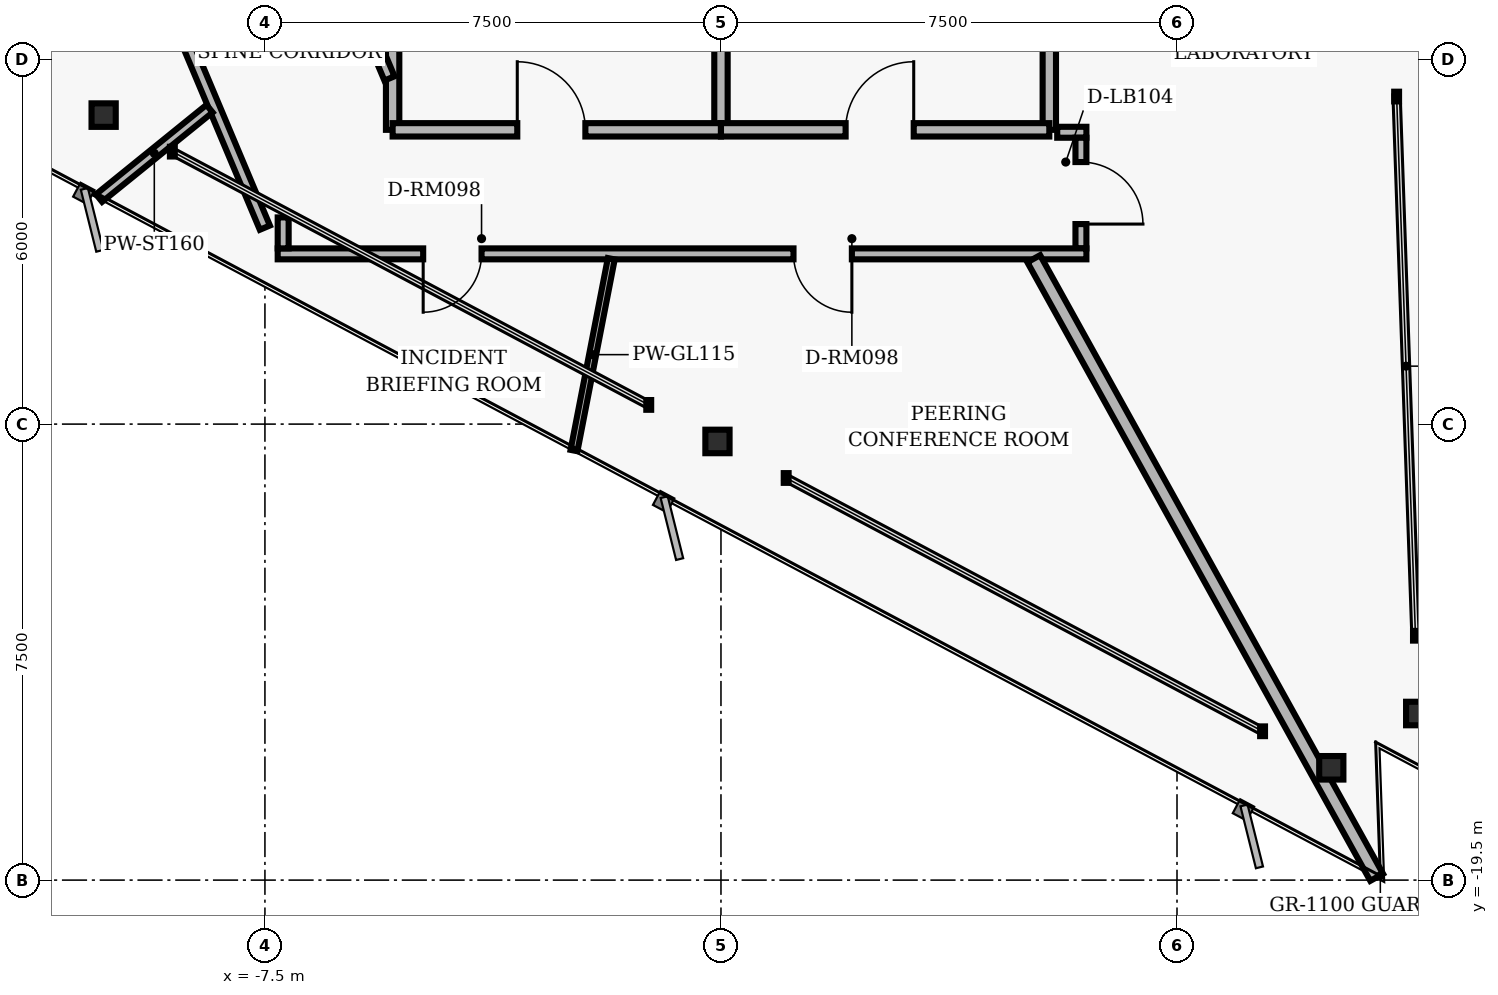
"""IFC4 building model, lengths in metres.
Left out: names, types, materials, properties, quantities, classifications, styles, units other than length and angle.
Written with IfcOpenShell. Run it as: python <this file> out.ifc"""

import sys

from ifc_helpers import new_model, si_unit, direction, frame, frame_2d, origin, origin_2d, place, context, subcontext, project, spatial, rectangle, i_section, extrude, element, fill, save


model = new_model("IFC4")
c1 = context("Model", 3, precision=1e-05, world=origin(), true_north=direction((0.0, 1.0)))
c2 = subcontext(c1, "Body", "Model", "MODEL_VIEW")
j1 = project(units=[si_unit("LENGTHUNIT", "METRE"), si_unit("PLANEANGLEUNIT", "RADIAN")], contexts=[c1])
p1 = place(None, origin())
s1 = spatial("IfcSite", under=j1, at=p1, CompositionType="ELEMENT")
p2 = place(p1, origin())
s2 = spatial("IfcBuilding", under=s1, at=p2, CompositionType="ELEMENT")
p3 = place(p2, frame((0.0, 0.0, 196.64)))
s3 = spatial("IfcBuildingStorey", under=s2, at=p3, CompositionType="ELEMENT", Elevation=196.64)
for number, where, z_axis, x_axis in (
    (1, (11.466, -16.76, 0.0), (0.0, 0.0, 1.0), (1.0, 0.0, 0.0)),
    (2, (-10.153, -6.918, 0.0), (0.0, 0.0, 1.0), (1.0, 0.0, 0.0)),
    (3, (-0.058, -12.285, 0.0), (0.0, 0.0, 1.0), (1.0, 0.0, 0.0)),
    (4, (10.037, -17.653, 0.0), (0.0, 0.0, 1.0), (1.0, 0.0, 0.0)),
):
    element("IfcColumn", number, at=place(p3, frame(where, z_axis=z_axis, x_axis=x_axis)), inside=s3, PredefinedType="COLUMN", context=c2, shape_type="SweptSolid", body=[
        extrude(i_section(OverallWidth=0.398, OverallDepth=0.387, WebThickness=0.021, FlangeThickness=0.033, FilletRadius=0.018, at=origin_2d()), origin(), (0.0, 0.0, 1.0), 3.04),
    ])
for number, where, z_axis, x_axis in (
    (5, (-5.4, -7.16, 0.0), (0.0, 0.0, 1.0), (0.0, 1.0, 0.0)),
    (6, (5.4, -7.16, 0.0), (0.0, 0.0, 1.0), (0.0, 1.0, 0.0)),
):
    element("IfcWall", number, at=place(p3, frame(where, z_axis=z_axis, x_axis=x_axis)), inside=s3, PredefinedType="PARTITIONING", context=c2, shape_type="SweptSolid", body=[
        extrude(rectangle(XDim=2.71, YDim=0.22, at=frame_2d((1.355, 0.0))), origin(), (0.0, 0.0, 1.0), 2.773),
    ])
p4 = place(p3, frame((0.0, -7.16, 0.0), z_axis=(0.0, 0.0, 1.0), x_axis=(0.0, 1.0, 0.0)))
e7 = element("IfcWall", 7, at=p4, inside=s3, PredefinedType="PARTITIONING", context=c2, shape_type="SweptSolid", body=[
    extrude(rectangle(XDim=2.81, YDim=0.22, at=frame_2d((1.405, 0.0))), origin(), (0.0, 0.0, 1.0), 2.773),
])
p5 = place(p3, frame((-5.4, -7.16, 0.0), z_axis=(0.0, 0.0, 1.0), x_axis=(1.0, 0.0, 0.0)))
e8 = element("IfcWall", 8, at=p5, inside=s3, PredefinedType="PARTITIONING", context=c2, shape_type="SweptSolid", body=[
    extrude(rectangle(XDim=5.4, YDim=0.22, at=frame_2d((2.7, 0.0))), origin(), (0.0, 0.0, 1.0), 2.395),
])
p6 = place(p5, frame((2.05, 0.0, 0.0)))
e9 = element("IfcOpeningElement", 9, at=p6, cuts=e8, PredefinedType="OPENING", context=c2, shape_type="SweptSolid", body=[
    extrude(rectangle(XDim=1.12, YDim=2.02, at=frame_2d((0.56, 1.01))), frame((0.0, 0.12, 0.0), z_axis=(0.0, -1.0, 0.0), x_axis=(1.0, 0.0, 0.0)), (0.0, 0.0, 1.0), 0.24),
])
p7 = place(p3, frame((0.0, -7.16, 0.0), z_axis=(0.0, 0.0, 1.0), x_axis=(1.0, 0.0, 0.0)))
e10 = element("IfcWall", 10, at=p7, inside=s3, PredefinedType="PARTITIONING", context=c2, shape_type="SweptSolid", body=[
    extrude(rectangle(XDim=5.4, YDim=0.22, at=frame_2d((2.7, 0.0))), origin(), (0.0, 0.0, 1.0), 2.773),
])
p8 = place(p7, frame((2.05, 0.0, 0.0)))
e11 = element("IfcOpeningElement", 11, at=p8, cuts=e10, PredefinedType="OPENING", context=c2, shape_type="SweptSolid", body=[
    extrude(rectangle(XDim=1.12, YDim=2.02, at=frame_2d((0.56, 1.01))), frame((0.0, 0.12, 0.0), z_axis=(0.0, -1.0, 0.0), x_axis=(1.0, 0.0, 0.0)), (0.0, 0.0, 1.0), 0.24),
])
p9 = place(p3, frame((-7.501, -8.769, 0.0), z_axis=(0.0, 0.0, 1.0), x_axis=(-0.387573945081, 0.921838617706, 0.0)))
e12 = element("IfcWall", 12, at=p9, inside=s3, PredefinedType="PARTITIONING", context=c2, shape_type="SweptSolid", body=[
    extrude(rectangle(XDim=4.813, YDim=0.18, at=frame_2d((2.407, 0.0))), origin(), (0.0, 0.0, 1.0), 2.773),
])
p10 = place(p3, frame((-6.055, -4.882, 0.0), z_axis=(0.0, 0.0, 1.0), x_axis=(0.387579540458, -0.921836265189, 0.0)))
e13 = element("IfcWall", 13, at=p10, inside=s3, PredefinedType="PARTITIONING", context=c2, shape_type="SweptSolid", body=[
    extrude(rectangle(XDim=1.555, YDim=0.18, at=frame_2d((0.777, 0.0))), origin(), (0.0, 0.0, 1.0), 2.253),
])
p11 = place(p3, frame((5.53, -7.2, 0.0), z_axis=(0.0, 0.0, 1.0), x_axis=(1.0, 0.0, 0.0)))
e14 = element("IfcWall", 14, at=p11, inside=s3, PredefinedType="PARTITIONING", context=c2, shape_type="SweptSolid", body=[
    extrude(rectangle(XDim=0.48, YDim=0.18, at=frame_2d((0.24, 0.0))), origin(), (0.0, 0.0, 1.0), 2.773),
])
p12 = place(p3, frame((5.92, -7.29, 0.0), z_axis=(0.0, 0.0, 1.0), x_axis=(0.0, -1.0, 0.0)))
e15 = element("IfcWall", 15, at=p12, inside=s3, PredefinedType="PARTITIONING", context=c2, shape_type="SweptSolid", body=[
    extrude(rectangle(XDim=1.82, YDim=0.18, at=frame_2d((0.91, 0.0))), origin(), (0.0, 0.0, 1.0), 2.773),
])
p13 = place(p12, frame((0.4, 0.0, 0.0)))
e16 = element("IfcOpeningElement", 16, at=p13, cuts=e15, PredefinedType="OPENING", context=c2, shape_type="SweptSolid", body=[
    extrude(rectangle(XDim=1.02, YDim=2.02, at=frame_2d((0.51, 1.01))), frame((0.0, 0.1, 0.0), z_axis=(0.0, -1.0, 0.0), x_axis=(1.0, 0.0, 0.0)), (0.0, 0.0, 1.0), 0.2),
])
p14 = place(p3, frame((6.01, -9.2, 0.0), z_axis=(0.0, 0.0, 1.0), x_axis=(-1.0, 0.0, 0.0)))
e17 = element("IfcWall", 17, at=p14, inside=s3, PredefinedType="PARTITIONING", context=c2, shape_type="SweptSolid", body=[
    extrude(rectangle(XDim=13.3, YDim=0.18, at=frame_2d((6.65, 0.0))), origin(), (0.0, 0.0, 1.0), 2.395),
])
p15 = place(p14, frame((9.948, 0.0, 0.0)))
e18 = element("IfcOpeningElement", 18, at=p15, cuts=e17, PredefinedType="OPENING", context=c2, shape_type="SweptSolid", body=[
    extrude(rectangle(XDim=0.96, YDim=2.02, at=frame_2d((0.48, 1.01))), frame((0.0, 0.1, 0.0), z_axis=(0.0, -1.0, 0.0), x_axis=(1.0, 0.0, 0.0)), (0.0, 0.0, 1.0), 0.2),
])
p16 = place(p14, frame((3.857, 0.0, 0.0)))
e19 = element("IfcOpeningElement", 19, at=p16, cuts=e17, PredefinedType="OPENING", context=c2, shape_type="SweptSolid", body=[
    extrude(rectangle(XDim=0.96, YDim=2.02, at=frame_2d((0.48, 1.01))), frame((0.0, 0.1, 0.0), z_axis=(0.0, -1.0, 0.0), x_axis=(1.0, 0.0, 0.0)), (0.0, 0.0, 1.0), 0.2),
])
p17 = place(p3, frame((-7.2, -9.11, 0.0), z_axis=(0.0, 0.0, 1.0), x_axis=(0.0, 1.0, 0.0)))
e20 = element("IfcWall", 20, at=p17, inside=s3, PredefinedType="PARTITIONING", context=c2, shape_type="SweptSolid", body=[
    extrude(rectangle(XDim=0.51, YDim=0.18, at=frame_2d((0.255, 0.0))), origin(), (0.0, 0.0, 1.0), 2.773),
])
p18 = place(p3, frame((-8.411, -6.811, 0.0), z_axis=(0.0, 0.0, 1.0), x_axis=(-0.777176762159, -0.629282353448, 0.0)))
e21 = element("IfcWall", 21, at=p18, inside=s3, PredefinedType="PARTITIONING", context=c2, shape_type="SweptSolid", body=[
    extrude(rectangle(XDim=2.337, YDim=0.16, at=frame_2d((1.169, 0.0))), origin(), (0.0, 0.0, 1.0), 2.773),
])
p19 = place(p3, frame((-1.804, -9.28, 0.0), z_axis=(0.0, 0.0, 1.0), x_axis=(-0.190810698239, -0.981626852443, 0.0)))
e22 = element("IfcWall", 22, at=p19, inside=s3, PredefinedType="MOVABLE", context=c2, shape_type="SweptSolid", body=[
    extrude(rectangle(XDim=3.214, YDim=0.115, at=frame_2d((1.607, 0.0))), origin(), (0.0, 0.0, 1.0), 2.773),
])
p20 = place(p3, frame((5.144, -9.28, 0.0), z_axis=(0.0, 0.0, 1.0), x_axis=(0.484798043034, -0.874626124393, 0.0)))
e23 = element("IfcWall", 23, at=p20, inside=s3, PredefinedType="PARTITIONING", context=c2, shape_type="SweptSolid", body=[
    extrude(rectangle(XDim=11.633, YDim=0.24, at=frame_2d((5.816, 0.0))), origin(), (0.0, 0.0, 1.0), 2.253),
])
p21 = place(p6, origin())
e24 = element("IfcDoor", 24, at=p21, inside=s3, OperationType="SINGLE_SWING_LEFT", PredefinedType="DOOR", context=c2, shape_type="SweptSolid", body=[
    extrude(rectangle(XDim=1.12, YDim=2.02, at=frame_2d((0.56, 1.01))), frame((0.0, 0.025, 0.0), z_axis=(0.0, -1.0, 0.0), x_axis=(1.0, 0.0, 0.0)), (0.0, 0.0, 1.0), 0.05),
])
fill(e9, e24)
p22 = place(p8, origin())
e25 = element("IfcDoor", 25, at=p22, inside=s3, OperationType="SINGLE_SWING_RIGHT", PredefinedType="DOOR", context=c2, shape_type="SweptSolid", body=[
    extrude(rectangle(XDim=1.12, YDim=2.02, at=frame_2d((0.56, 1.01))), frame((0.0, 0.025, 0.0), z_axis=(0.0, -1.0, 0.0), x_axis=(1.0, 0.0, 0.0)), (0.0, 0.0, 1.0), 0.05),
])
fill(e11, e25)
p23 = place(p15, origin())
e26 = element("IfcDoor", 26, at=p23, inside=s3, OperationType="SINGLE_SWING_RIGHT", PredefinedType="DOOR", context=c2, shape_type="SweptSolid", body=[
    extrude(rectangle(XDim=0.96, YDim=2.02, at=frame_2d((0.48, 1.01))), frame((0.0, 0.025, 0.0), z_axis=(0.0, -1.0, 0.0), x_axis=(1.0, 0.0, 0.0)), (0.0, 0.0, 1.0), 0.05),
])
fill(e18, e26)
p24 = place(p16, origin())
e27 = element("IfcDoor", 27, at=p24, inside=s3, OperationType="SINGLE_SWING_LEFT", PredefinedType="DOOR", context=c2, shape_type="SweptSolid", body=[
    extrude(rectangle(XDim=0.96, YDim=2.02, at=frame_2d((0.48, 1.01))), frame((0.0, 0.025, 0.0), z_axis=(0.0, -1.0, 0.0), x_axis=(1.0, 0.0, 0.0)), (0.0, 0.0, 1.0), 0.05),
])
fill(e19, e27)
p25 = place(p13, origin())
e28 = element("IfcDoor", 28, at=p25, inside=s3, OperationType="SINGLE_SWING_RIGHT", PredefinedType="DOOR", context=c2, shape_type="SweptSolid", body=[
    extrude(rectangle(XDim=1.02, YDim=2.02, at=frame_2d((0.51, 1.01))), frame((0.0, 0.025, 0.0), z_axis=(0.0, -1.0, 0.0), x_axis=(1.0, 0.0, 0.0)), (0.0, 0.0, 1.0), 0.05),
])
fill(e16, e28)
save(model, sys.argv[1])
